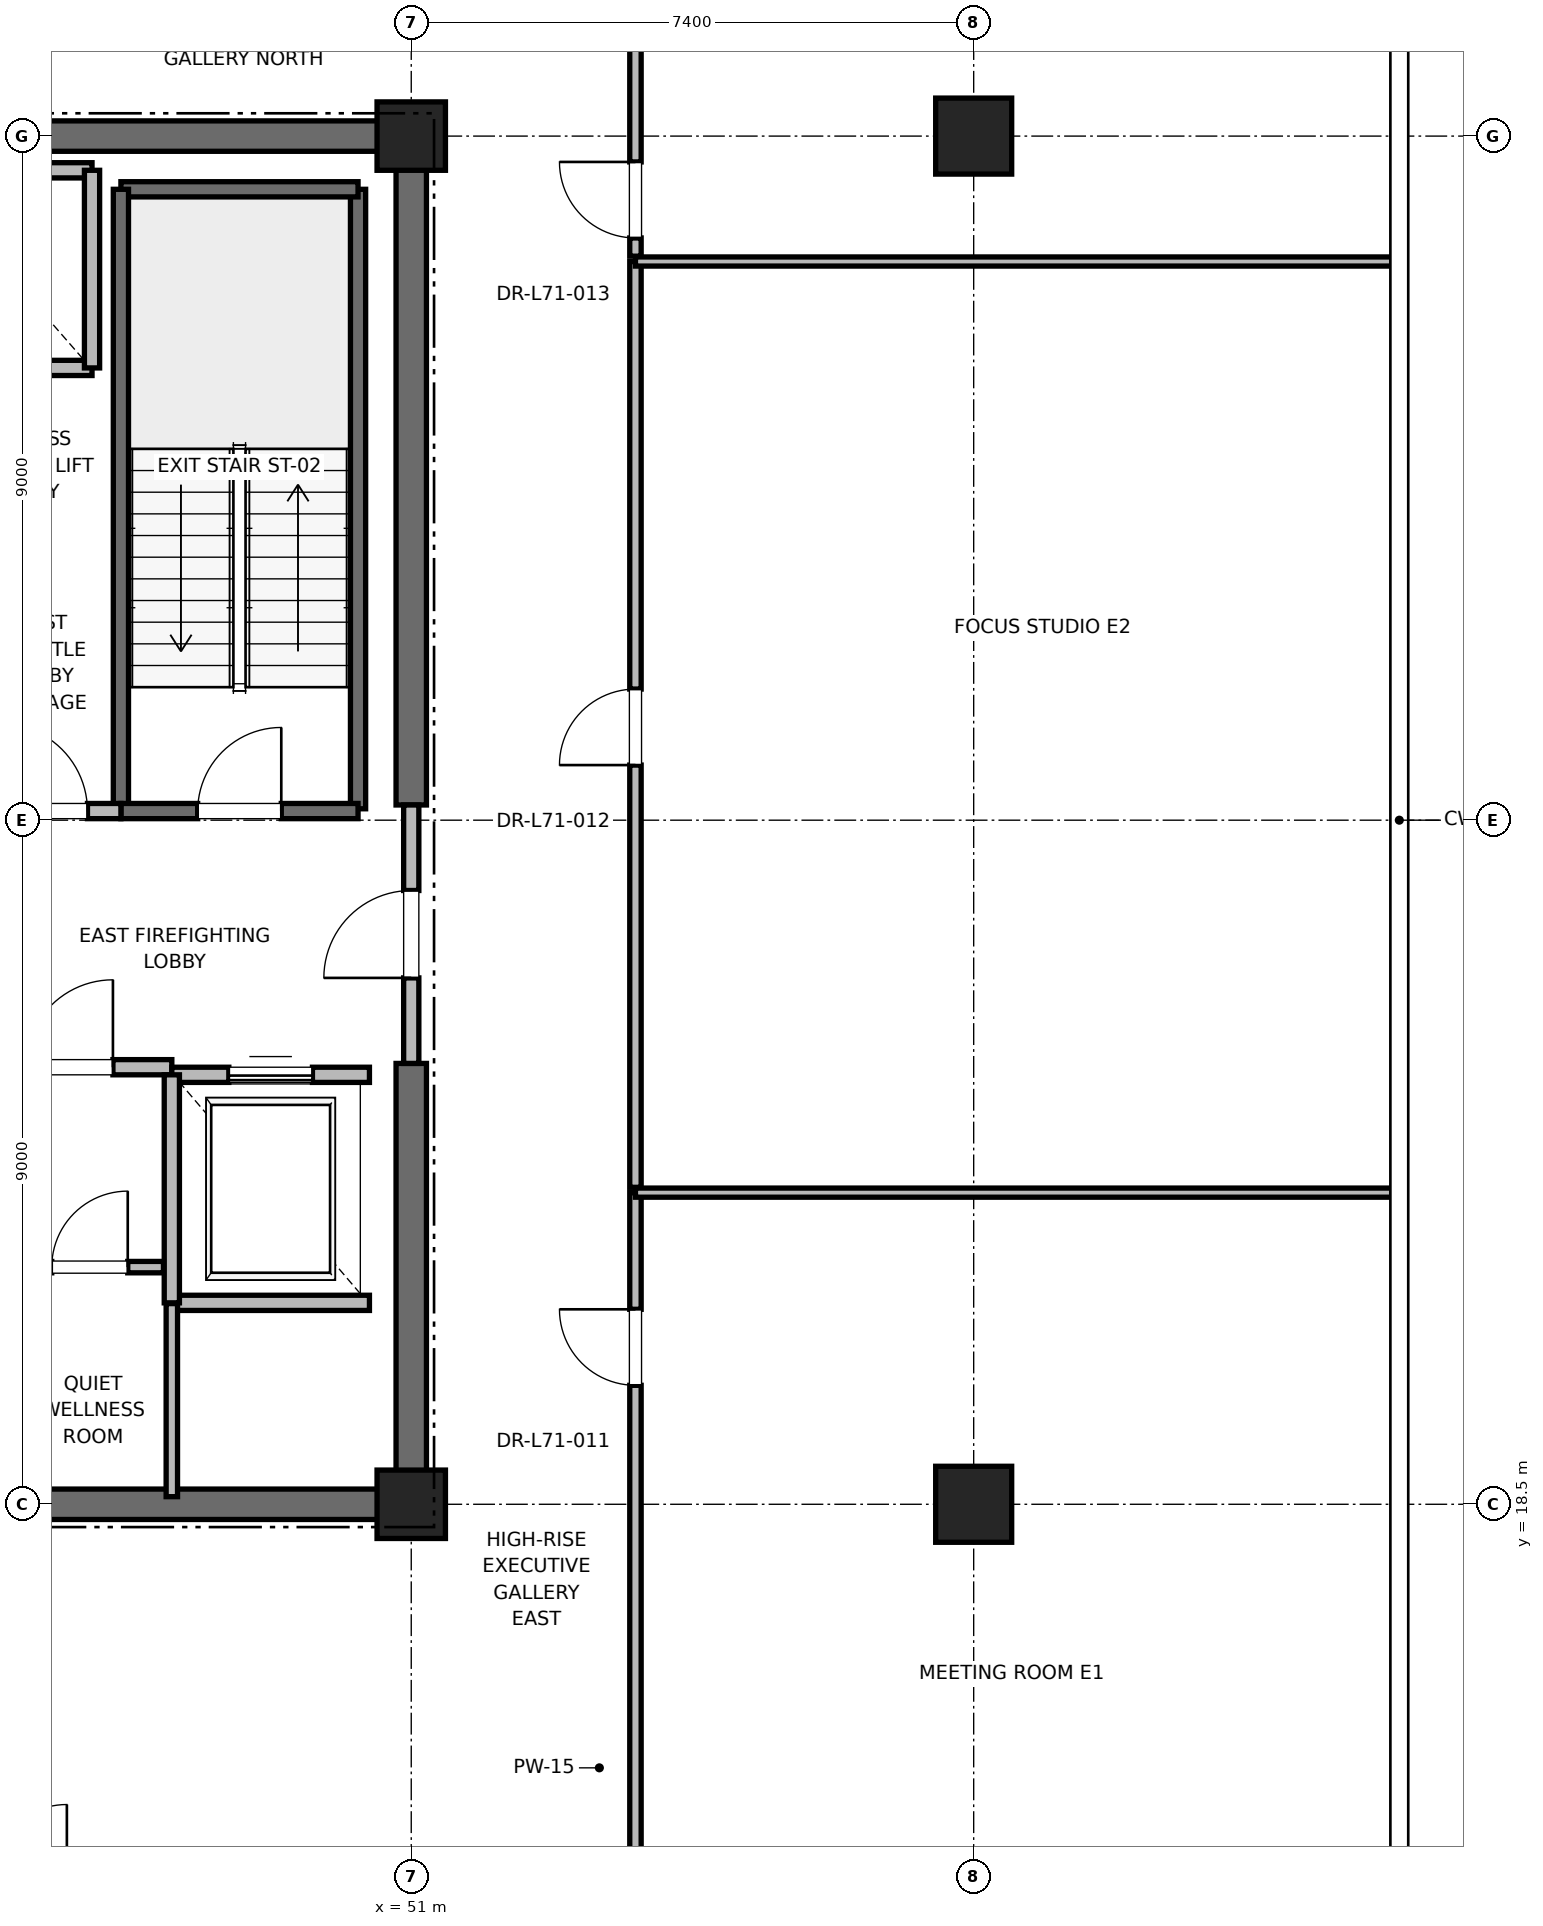
"""IFC4 building model, lengths in metres.
Left out: names, types, materials, properties, quantities, classifications, styles, units other than length and angle.
Written with IfcOpenShell. Run it as: python <this file> out.ifc"""

import sys

from ifc_helpers import new_model, si_unit, direction, frame, frame_2d, origin, origin_2d, place, context, subcontext, project, spatial, rectangle, extrude, element, fill, save


model = new_model("IFC4")
c1 = context("Model", 3, precision=1e-05, world=origin(), true_north=direction((0.0, 1.0)))
c2 = subcontext(c1, "Body", "Model", "MODEL_VIEW")
j1 = project(units=[si_unit("LENGTHUNIT", "METRE"), si_unit("PLANEANGLEUNIT", "RADIAN")], contexts=[c1])
p1 = place(None, origin())
s1 = spatial("IfcSite", under=j1, at=p1, CompositionType="ELEMENT")
p2 = place(p1, origin())
s2 = spatial("IfcBuilding", under=s1, at=p2, CompositionType="ELEMENT")
p3 = place(p2, frame((0.0, 0.0, 306.8)))
s3 = spatial("IfcBuildingStorey", under=s2, at=p3, CompositionType="ELEMENT", Elevation=306.8)
for number, where, z_axis, x_axis in (
    (1, (58.4, 18.5, 0.0), (0.0, 0.0, 1.0), (1.0, 0.0, 0.0)),
    (2, (58.4, 36.5, 0.0), (0.0, 0.0, 1.0), (1.0, 0.0, 0.0)),
):
    element("IfcColumn", number, at=place(p3, frame(where, z_axis=z_axis, x_axis=x_axis)), inside=s3, PredefinedType="COLUMN", context=c2, shape_type="SweptSolid", body=[
        extrude(rectangle(XDim=1.0, YDim=1.0, at=origin_2d()), origin(), (0.0, 0.0, 1.0), 4.0),
    ])
for number, where, z_axis, x_axis in (
    (3, (51.0, 18.5, 0.0), (0.0, 0.0, 1.0), (1.0, 0.0, 0.0)),
    (4, (51.0, 36.5, 0.0), (0.0, 0.0, 1.0), (1.0, 0.0, 0.0)),
):
    element("IfcColumn", number, at=place(p3, frame(where, z_axis=z_axis, x_axis=x_axis)), inside=s3, PredefinedType="PILASTER", context=c2, shape_type="SweptSolid", body=[
        extrude(rectangle(XDim=0.9, YDim=0.9, at=origin_2d()), origin(), (0.0, 0.0, 1.0), 4.0),
    ])
p4 = place(p3, frame((41.8, 18.5, 0.0), z_axis=(0.0, 0.0, 1.0), x_axis=(1.0, 0.0, 0.0)))
e5 = element("IfcWall", 5, at=p4, inside=s3, PredefinedType="SHEAR", context=c2, shape_type="SweptSolid", body=[
    extrude(rectangle(XDim=9.2, YDim=0.4, at=frame_2d((4.6, 0.0))), origin(), (0.0, 0.0, 1.0), 3.785),
])
for number, where, z_axis, x_axis in (
    (6, (45.2, 36.5, 0.0), (0.0, 0.0, 1.0), (1.0, 0.0, 0.0)),
    (7, (51.0, 18.5, 0.0), (0.0, 0.0, 1.0), (0.0, 1.0, 0.0)),
):
    element("IfcWall", number, at=place(p3, frame(where, z_axis=z_axis, x_axis=x_axis)), inside=s3, PredefinedType="SHEAR", context=c2, shape_type="SweptSolid", body=[
        extrude(rectangle(XDim=5.8, YDim=0.4, at=frame_2d((2.9, 0.0))), origin(), (0.0, 0.0, 1.0), 3.785),
    ])
p5 = place(p3, frame((51.0, 27.7, 0.0), z_axis=(0.0, 0.0, 1.0), x_axis=(0.0, 1.0, 0.0)))
e8 = element("IfcWall", 8, at=p5, inside=s3, PredefinedType="SHEAR", context=c2, shape_type="SweptSolid", body=[
    extrude(rectangle(XDim=8.8, YDim=0.4, at=frame_2d((4.4, 0.0))), origin(), (0.0, 0.0, 1.0), 3.785),
])
p6 = place(p3, frame((50.3, 27.65, 0.0), z_axis=(0.0, 0.0, 1.0), x_axis=(0.0, 1.0, 0.0)))
e9 = element("IfcWall", 9, at=p6, inside=s3, PredefinedType="SOLIDWALL", context=c2, shape_type="SweptSolid", body=[
    extrude(rectangle(XDim=8.15, YDim=0.2, at=frame_2d((4.075, 0.0))), origin(), (0.0, 0.0, 1.0), 3.785),
])
p7 = place(p3, frame((47.18, 35.8, 0.0), z_axis=(0.0, 0.0, 1.0), x_axis=(1.0, 0.0, 0.0)))
e10 = element("IfcWall", 10, at=p7, inside=s3, PredefinedType="SOLIDWALL", context=c2, shape_type="SweptSolid", body=[
    extrude(rectangle(XDim=3.12, YDim=0.2, at=frame_2d((1.56, 0.0))), origin(), (0.0, 0.0, 1.0), 3.785),
])
p8 = place(p3, frame((47.18, 27.62, 0.0), z_axis=(0.0, 0.0, 1.0), x_axis=(0.0, 1.0, 0.0)))
e11 = element("IfcWall", 11, at=p8, inside=s3, PredefinedType="SOLIDWALL", context=c2, shape_type="SweptSolid", body=[
    extrude(rectangle(XDim=8.18, YDim=0.2, at=frame_2d((4.09, 0.0))), origin(), (0.0, 0.0, 1.0), 3.785),
])
p9 = place(p3, frame((47.18, 27.62, 0.0), z_axis=(0.0, 0.0, 1.0), x_axis=(1.0, 0.0, 0.0)))
e12 = element("IfcWall", 12, at=p9, inside=s3, PredefinedType="SOLIDWALL", context=c2, shape_type="SweptSolid", body=[
    extrude(rectangle(XDim=3.12, YDim=0.2, at=frame_2d((1.56, 0.0))), origin(), (0.0, 0.0, 1.0), 3.785),
])
p10 = place(p9, frame((1.01, 0.0, 0.0)))
e13 = element("IfcOpeningElement", 13, at=p10, cuts=e12, PredefinedType="OPENING", context=c2, shape_type="SweptSolid", body=[
    extrude(rectangle(XDim=1.1, YDim=2.15, at=frame_2d((0.55, 1.075))), frame((0.0, 0.1, 0.0), z_axis=(0.0, -1.0, 0.0), x_axis=(1.0, 0.0, 0.0)), (0.0, 0.0, 1.0), 0.2),
])
p11 = place(p3, frame((45.15, 24.25, 0.0), z_axis=(0.0, 0.0, 1.0), x_axis=(1.0, 0.0, 0.0)))
e14 = element("IfcWall", 14, at=p11, inside=s3, PredefinedType="PARTITIONING", context=c2, shape_type="SweptSolid", body=[
    extrude(rectangle(XDim=2.7, YDim=0.2, at=frame_2d((1.35, 0.0))), origin(), (0.0, 0.0, 1.0), 3.785),
])
p12 = place(p11, frame((0.775, 0.0, 0.0)))
e15 = element("IfcOpeningElement", 15, at=p12, cuts=e14, PredefinedType="OPENING", context=c2, shape_type="SweptSolid", body=[
    extrude(rectangle(XDim=1.15, YDim=2.2, at=frame_2d((0.575, 1.1))), frame((0.0, 0.1, 0.0), z_axis=(0.0, -1.0, 0.0), x_axis=(1.0, 0.0, 0.0)), (0.0, 0.0, 1.0), 0.2),
])
p13 = place(p3, frame((45.15, 27.62, 0.0), z_axis=(0.0, 0.0, 1.0), x_axis=(1.0, 0.0, 0.0)))
e16 = element("IfcWall", 16, at=p13, inside=s3, PredefinedType="PARTITIONING", context=c2, shape_type="SweptSolid", body=[
    extrude(rectangle(XDim=2.03, YDim=0.2, at=frame_2d((1.015, 0.0))), origin(), (0.0, 0.0, 1.0), 3.785),
])
p14 = place(p13, frame((0.44, 0.0, 0.0)))
e17 = element("IfcOpeningElement", 17, at=p14, cuts=e16, PredefinedType="OPENING", context=c2, shape_type="SweptSolid", body=[
    extrude(rectangle(XDim=1.15, YDim=2.2, at=frame_2d((0.575, 1.1))), frame((0.0, 0.1, 0.0), z_axis=(0.0, -1.0, 0.0), x_axis=(1.0, 0.0, 0.0)), (0.0, 0.0, 1.0), 0.2),
])
p15 = place(p3, frame((51.0, 24.3, 0.0), z_axis=(0.0, 0.0, 1.0), x_axis=(0.0, 1.0, 0.0)))
e18 = element("IfcWall", 18, at=p15, inside=s3, PredefinedType="PARTITIONING", context=c2, shape_type="SweptSolid", body=[
    extrude(rectangle(XDim=3.4, YDim=0.2, at=frame_2d((1.7, 0.0))), origin(), (0.0, 0.0, 1.0), 2.865),
])
p16 = place(p15, frame((1.125, 0.0, 0.0)))
e19 = element("IfcOpeningElement", 19, at=p16, cuts=e18, PredefinedType="OPENING", context=c2, shape_type="SweptSolid", body=[
    extrude(rectangle(XDim=1.15, YDim=2.2, at=frame_2d((0.575, 1.1))), frame((0.0, 0.1, 0.0), z_axis=(0.0, -1.0, 0.0), x_axis=(1.0, 0.0, 0.0)), (0.0, 0.0, 1.0), 0.2),
])
p17 = place(p3, frame((47.85, 21.15, 0.0), z_axis=(0.0, 0.0, 1.0), x_axis=(1.0, 0.0, 0.0)))
e20 = element("IfcWall", 20, at=p17, inside=s3, PredefinedType="SOLIDWALL", context=c2, shape_type="SweptSolid", body=[
    extrude(rectangle(XDim=2.6, YDim=0.2, at=frame_2d((1.3, 0.0))), origin(), (0.0, 0.0, 1.0), 3.785),
])
p18 = place(p3, frame((50.45, 24.15, 0.0), z_axis=(0.0, 0.0, 1.0), x_axis=(-1.0, 0.0, 0.0)))
e21 = element("IfcWall", 21, at=p18, inside=s3, PredefinedType="SOLIDWALL", context=c2, shape_type="SweptSolid", body=[
    extrude(rectangle(XDim=2.6, YDim=0.2, at=frame_2d((1.3, 0.0))), origin(), (0.0, 0.0, 1.0), 2.865),
])
p19 = place(p18, frame((0.75, 0.0, 0.0)))
e22 = element("IfcOpeningElement", 22, at=p19, cuts=e21, PredefinedType="OPENING", context=c2, shape_type="SweptSolid", body=[
    extrude(rectangle(XDim=1.1, YDim=2.2, at=frame_2d((0.55, 1.1))), frame((0.0, 0.1, 0.0), z_axis=(0.0, -1.0, 0.0), x_axis=(1.0, 0.0, 0.0)), (0.0, 0.0, 1.0), 0.2),
])
p20 = place(p3, frame((47.85, 24.15, 0.0), z_axis=(0.0, 0.0, 1.0), x_axis=(0.0, -1.0, 0.0)))
e23 = element("IfcWall", 23, at=p20, inside=s3, PredefinedType="SOLIDWALL", context=c2, shape_type="SweptSolid", body=[
    extrude(rectangle(XDim=3.0, YDim=0.2, at=frame_2d((1.5, 0.0))), origin(), (0.0, 0.0, 1.0), 3.785),
])
p21 = place(p3, frame((44.5, 33.45, 0.0), z_axis=(0.0, 0.0, 1.0), x_axis=(1.0, 0.0, 0.0)))
e24 = element("IfcWall", 24, at=p21, inside=s3, PredefinedType="SOLIDWALL", context=c2, shape_type="SweptSolid", body=[
    extrude(rectangle(XDim=2.3, YDim=0.2, at=frame_2d((1.15, 0.0))), origin(), (0.0, 0.0, 1.0), 3.785),
])
p22 = place(p3, frame((46.8, 36.05, 0.0), z_axis=(0.0, 0.0, 1.0), x_axis=(-1.0, 0.0, 0.0)))
e25 = element("IfcWall", 25, at=p22, inside=s3, PredefinedType="SOLIDWALL", context=c2, shape_type="SweptSolid", body=[
    extrude(rectangle(XDim=2.3, YDim=0.2, at=frame_2d((1.15, 0.0))), origin(), (0.0, 0.0, 1.0), 2.865),
])
p23 = place(p3, frame((46.8, 33.45, 0.0), z_axis=(0.0, 0.0, 1.0), x_axis=(0.0, 1.0, 0.0)))
e26 = element("IfcWall", 26, at=p23, inside=s3, PredefinedType="SOLIDWALL", context=c2, shape_type="SweptSolid", body=[
    extrude(rectangle(XDim=2.6, YDim=0.2, at=frame_2d((1.3, 0.0))), origin(), (0.0, 0.0, 1.0), 3.785),
])
p24 = place(p3, frame((47.85, 18.6, 0.0), z_axis=(0.0, 0.0, 1.0), x_axis=(0.0, 1.0, 0.0)))
e27 = element("IfcWall", 27, at=p24, inside=s3, PredefinedType="PARTITIONING", context=c2, shape_type="SweptSolid", body=[
    extrude(rectangle(XDim=2.54, YDim=0.15, at=frame_2d((1.27, 0.0))), origin(), (0.0, 0.0, 1.0), 2.85),
])
p25 = place(p3, frame((45.8, 21.62, 0.0), z_axis=(0.0, 0.0, 1.0), x_axis=(1.0, 0.0, 0.0)))
e28 = element("IfcWall", 28, at=p25, inside=s3, PredefinedType="PARTITIONING", context=c2, shape_type="SweptSolid", body=[
    extrude(rectangle(XDim=1.94, YDim=0.15, at=frame_2d((0.97, 0.0))), origin(), (0.0, 0.0, 1.0), 2.85),
])
p26 = place(p25, frame((0.47, 0.0, 0.0)))
e29 = element("IfcOpeningElement", 29, at=p26, cuts=e28, PredefinedType="OPENING", context=c2, shape_type="SweptSolid", body=[
    extrude(rectangle(XDim=1.0, YDim=2.15, at=frame_2d((0.5, 1.075))), frame((0.0, 0.075, 0.0), z_axis=(0.0, -1.0, 0.0), x_axis=(1.0, 0.0, 0.0)), (0.0, 0.0, 1.0), 0.15),
])
p27 = place(p3, frame((53.95, 10.0, 0.0), z_axis=(0.0, 0.0, 1.0), x_axis=(0.0, 1.0, 0.0)))
e30 = element("IfcWall", 30, at=p27, inside=s3, PredefinedType="PARTITIONING", context=c2, shape_type="SweptSolid", body=[
    extrude(rectangle(XDim=12.6, YDim=0.15, at=frame_2d((6.3, 0.0))), origin(), (0.0, 0.0, 1.0), 2.85),
])
p28 = place(p27, frame((10.065, 0.0, 0.0)))
e31 = element("IfcOpeningElement", 31, at=p28, cuts=e30, PredefinedType="OPENING", context=c2, shape_type="SweptSolid", body=[
    extrude(rectangle(XDim=1.0, YDim=2.15, at=frame_2d((0.5, 1.075))), frame((0.0, 0.075, 0.0), z_axis=(0.0, -1.0, 0.0), x_axis=(1.0, 0.0, 0.0)), (0.0, 0.0, 1.0), 0.15),
])
p29 = place(p3, frame((53.95, 22.6, 0.0), z_axis=(0.0, 0.0, 1.0), x_axis=(1.0, 0.0, 0.0)))
e32 = element("IfcWall", 32, at=p29, inside=s3, PredefinedType="PARTITIONING", context=c2, shape_type="SweptSolid", body=[
    extrude(rectangle(XDim=9.95, YDim=0.12, at=frame_2d((4.975, 0.0))), origin(), (0.0, 0.0, 1.0), 2.85),
])
p30 = place(p3, frame((53.95, 22.67, 0.0), z_axis=(0.0, 0.0, 1.0), x_axis=(0.0, 1.0, 0.0)))
e33 = element("IfcWall", 33, at=p30, inside=s3, PredefinedType="PARTITIONING", context=c2, shape_type="SweptSolid", body=[
    extrude(rectangle(XDim=12.18, YDim=0.15, at=frame_2d((6.09, 0.0))), origin(), (0.0, 0.0, 1.0), 2.85),
])
p31 = place(p30, frame((5.555, 0.0, 0.0)))
e34 = element("IfcOpeningElement", 34, at=p31, cuts=e33, PredefinedType="OPENING", context=c2, shape_type="SweptSolid", body=[
    extrude(rectangle(XDim=1.0, YDim=2.15, at=frame_2d((0.5, 1.075))), frame((0.0, 0.075, 0.0), z_axis=(0.0, -1.0, 0.0), x_axis=(1.0, 0.0, 0.0)), (0.0, 0.0, 1.0), 0.15),
])
p32 = place(p3, frame((53.95, 34.85, 0.0), z_axis=(0.0, 0.0, 1.0), x_axis=(1.0, 0.0, 0.0)))
e35 = element("IfcWall", 35, at=p32, inside=s3, PredefinedType="PARTITIONING", context=c2, shape_type="SweptSolid", body=[
    extrude(rectangle(XDim=9.95, YDim=0.12, at=frame_2d((4.975, 0.0))), origin(), (0.0, 0.0, 1.0), 2.85),
])
p33 = place(p3, frame((53.95, 34.92, 0.0), z_axis=(0.0, 0.0, 1.0), x_axis=(0.0, 1.0, 0.0)))
e36 = element("IfcWall", 36, at=p33, inside=s3, PredefinedType="PARTITIONING", context=c2, shape_type="SweptSolid", body=[
    extrude(rectangle(XDim=10.08, YDim=0.15, at=frame_2d((5.04, 0.0))), origin(), (0.0, 0.0, 1.0), 2.85),
])
p34 = place(p33, frame((0.24, 0.0, 0.0)))
e37 = element("IfcOpeningElement", 37, at=p34, cuts=e36, PredefinedType="OPENING", context=c2, shape_type="SweptSolid", body=[
    extrude(rectangle(XDim=1.0, YDim=2.15, at=frame_2d((0.5, 1.075))), frame((0.0, 0.075, 0.0), z_axis=(0.0, -1.0, 0.0), x_axis=(1.0, 0.0, 0.0)), (0.0, 0.0, 1.0), 0.15),
])
p35 = place(p10, origin())
e38 = element("IfcDoor", 38, at=p35, inside=s3, OperationType="SINGLE_SWING_RIGHT", PredefinedType="DOOR", context=c2, shape_type="SweptSolid", body=[
    extrude(rectangle(XDim=1.1, YDim=2.15, at=frame_2d((0.55, 1.075))), frame((0.0, 0.025, 0.0), z_axis=(0.0, -1.0, 0.0), x_axis=(1.0, 0.0, 0.0)), (0.0, 0.0, 1.0), 0.05),
])
fill(e13, e38)
p36 = place(p12, origin())
e39 = element("IfcDoor", 39, at=p36, inside=s3, OperationType="SINGLE_SWING_RIGHT", PredefinedType="DOOR", context=c2, shape_type="SweptSolid", body=[
    extrude(rectangle(XDim=1.15, YDim=2.2, at=frame_2d((0.575, 1.1))), frame((0.0, 0.025, 0.0), z_axis=(0.0, -1.0, 0.0), x_axis=(1.0, 0.0, 0.0)), (0.0, 0.0, 1.0), 0.05),
])
fill(e15, e39)
p37 = place(p14, origin())
e40 = element("IfcDoor", 40, at=p37, inside=s3, OperationType="SINGLE_SWING_LEFT", PredefinedType="DOOR", context=c2, shape_type="SweptSolid", body=[
    extrude(rectangle(XDim=1.15, YDim=2.2, at=frame_2d((0.575, 1.1))), frame((0.0, 0.025, 0.0), z_axis=(0.0, -1.0, 0.0), x_axis=(1.0, 0.0, 0.0)), (0.0, 0.0, 1.0), 0.05),
])
fill(e17, e40)
p38 = place(p16, origin())
e41 = element("IfcDoor", 41, at=p38, inside=s3, OperationType="SINGLE_SWING_LEFT", PredefinedType="DOOR", context=c2, shape_type="SweptSolid", body=[
    extrude(rectangle(XDim=1.15, YDim=2.2, at=frame_2d((0.575, 1.1))), frame((0.0, 0.025, 0.0), z_axis=(0.0, -1.0, 0.0), x_axis=(1.0, 0.0, 0.0)), (0.0, 0.0, 1.0), 0.05),
])
fill(e19, e41)
p39 = place(p19, origin())
e42 = element("IfcDoor", 42, at=p39, inside=s3, OperationType="SLIDING_TO_RIGHT", PredefinedType="DOOR", context=c2, shape_type="SweptSolid", body=[
    extrude(rectangle(XDim=1.1, YDim=2.2, at=frame_2d((0.55, 1.1))), frame((0.0, 0.025, 0.0), z_axis=(0.0, -1.0, 0.0), x_axis=(1.0, 0.0, 0.0)), (0.0, 0.0, 1.0), 0.05),
])
fill(e22, e42)
p40 = place(p26, origin())
e43 = element("IfcDoor", 43, at=p40, inside=s3, OperationType="SINGLE_SWING_RIGHT", PredefinedType="DOOR", context=c2, shape_type="SweptSolid", body=[
    extrude(rectangle(XDim=1.0, YDim=2.15, at=frame_2d((0.5, 1.075))), frame((0.0, 0.025, 0.0), z_axis=(0.0, -1.0, 0.0), x_axis=(1.0, 0.0, 0.0)), (0.0, 0.0, 1.0), 0.05),
])
fill(e29, e43)
p41 = place(p28, origin())
e44 = element("IfcDoor", 44, at=p41, inside=s3, OperationType="SINGLE_SWING_RIGHT", PredefinedType="DOOR", context=c2, shape_type="SweptSolid", body=[
    extrude(rectangle(XDim=1.0, YDim=2.15, at=frame_2d((0.5, 1.075))), frame((0.0, 0.025, 0.0), z_axis=(0.0, -1.0, 0.0), x_axis=(1.0, 0.0, 0.0)), (0.0, 0.0, 1.0), 0.05),
])
fill(e31, e44)
p42 = place(p31, origin())
e45 = element("IfcDoor", 45, at=p42, inside=s3, OperationType="SINGLE_SWING_LEFT", PredefinedType="DOOR", context=c2, shape_type="SweptSolid", body=[
    extrude(rectangle(XDim=1.0, YDim=2.15, at=frame_2d((0.5, 1.075))), frame((0.0, 0.025, 0.0), z_axis=(0.0, -1.0, 0.0), x_axis=(1.0, 0.0, 0.0)), (0.0, 0.0, 1.0), 0.05),
])
fill(e34, e45)
p43 = place(p34, origin())
e46 = element("IfcDoor", 46, at=p43, inside=s3, OperationType="SINGLE_SWING_RIGHT", PredefinedType="DOOR", context=c2, shape_type="SweptSolid", body=[
    extrude(rectangle(XDim=1.0, YDim=2.15, at=frame_2d((0.5, 1.075))), frame((0.0, 0.025, 0.0), z_axis=(0.0, -1.0, 0.0), x_axis=(1.0, 0.0, 0.0)), (0.0, 0.0, 1.0), 0.05),
])
fill(e37, e46)
save(model, sys.argv[1])
